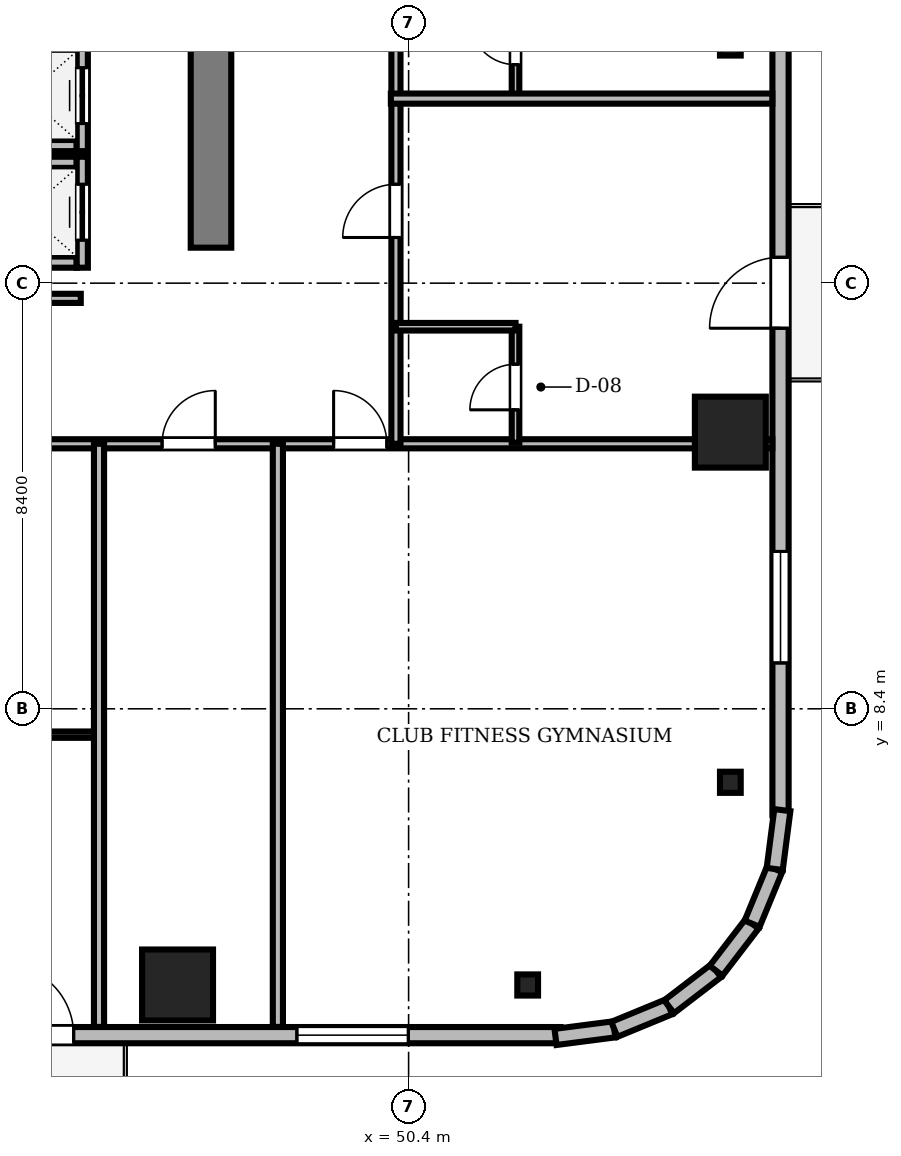
"""IFC4 building model, lengths in metres.
Left out: names, types, materials, properties, quantities, classifications, styles, units other than length and angle.
Written with IfcOpenShell. Run it as: python <this file> out.ifc"""

import sys

from ifc_helpers import new_model, si_unit, direction, frame, frame_2d, origin, origin_2d, place, context, subcontext, project, spatial, rectangle, i_section, extrude, source, transform, mapped, element, fill, save


model = new_model("IFC4")
c1 = context("Model", 3, precision=1e-05, world=origin(), true_north=direction((0.0, 1.0)))
c2 = subcontext(c1, "Body", "Model", "MODEL_VIEW")
j1 = project(units=[si_unit("LENGTHUNIT", "METRE"), si_unit("PLANEANGLEUNIT", "RADIAN")], contexts=[c1])
p1 = place(None, origin())
s1 = spatial("IfcSite", under=j1, at=p1, CompositionType="ELEMENT")
p2 = place(p1, origin())
s2 = spatial("IfcBuilding", under=s1, at=p2, CompositionType="ELEMENT")
p3 = place(p2, frame((0.0, 0.0, 229.8)))
s3 = spatial("IfcBuildingStorey", under=s2, at=p3, CompositionType="ELEMENT", Elevation=229.8)
m1 = source(origin(), c2, "Body", "SweptSolid", [
    extrude(rectangle(XDim=13.15, YDim=0.8, at=frame_2d((6.575, 0.0))), origin(), (0.0, 0.0, 1.0), 3.53),
])
p4 = place(p3, frame((46.5, 17.5, 0.0), z_axis=(0.0, 0.0, 1.0), x_axis=(0.0, 1.0, 0.0)))
e1 = element("IfcWall", 1, at=p4, inside=s3, PredefinedType="SHEAR", context=c2, shape_type="MappedRepresentation", body=[
    mapped(m1, transform((0.0, 0.0, 0.0), scale=1.0)),
])
m2 = source(origin(), c2, "Body", "SweptSolid", [
    extrude(rectangle(XDim=1.4, YDim=1.4, at=origin_2d()), origin(), (0.0, 0.0, 1.0), 3.53),
])
for number, where, z_axis, x_axis in (
    (2, (45.84, 2.95, 0.0), (0.0, 0.0, 1.0), (1.0, 0.0, 0.0)),
    (3, (56.75, 13.86, 0.0), (0.0, 0.0, 1.0), (1.0, 0.0, 0.0)),
):
    element("IfcColumn", number, at=place(p3, frame(where, z_axis=z_axis, x_axis=x_axis)), inside=s3, PredefinedType="COLUMN", context=c2, shape_type="MappedRepresentation", body=[
        mapped(m2, transform((0.0, 0.0, 0.0), scale=1.0)),
    ])
m3 = source(origin(), c2, "Body", "SweptSolid", [
    extrude(i_section(OverallWidth=0.409, OverallDepth=0.417, WebThickness=0.021, FlangeThickness=0.033, FilletRadius=0.015, at=origin_2d()), origin(), (0.0, 0.0, 1.0), 3.53),
])
for number, where, z_axis, x_axis in (
    (4, (52.75, 2.95, 0.0), (0.0, 0.0, 1.0), (1.0, 0.0, 0.0)),
    (5, (56.75, 6.95, 0.0), (0.0, 0.0, 1.0), (1.0, 0.0, 0.0)),
    (6, (56.75, 21.5, 0.0), (0.0, 0.0, 1.0), (1.0, 0.0, 0.0)),
):
    element("IfcColumn", number, at=place(p3, frame(where, z_axis=z_axis, x_axis=x_axis)), inside=s3, PredefinedType="COLUMN", context=c2, shape_type="MappedRepresentation", body=[
        mapped(m3, transform((0.0, 0.0, 0.0), scale=1.0)),
    ])
m4 = source(origin(), c2, "Body", "SweptSolid", [
    extrude(rectangle(XDim=15.6, YDim=0.32, at=frame_2d((7.8, 0.0))), origin(), (0.0, 0.0, 1.0), 3.53),
])
p5 = place(p3, frame((37.8, 1.96, 0.0), z_axis=(0.0, 0.0, 1.0), x_axis=(1.0, 0.0, 0.0)))
e7 = element("IfcWall", 7, at=p5, inside=s3, PredefinedType="SOLIDWALL", context=c2, shape_type="MappedRepresentation", body=[
    mapped(m4, transform((0.0, 0.0, 0.0), scale=1.0)),
])
m5 = source(origin(), c2, "Body", "SweptSolid", [
    extrude(rectangle(XDim=1.4, YDim=2.3, at=frame_2d((0.7, 1.15))), frame((0.0, 0.17, 0.0), z_axis=(0.0, -1.0, 0.0), x_axis=(1.0, 0.0, 0.0)), (0.0, 0.0, 1.0), 0.34),
])
p6 = place(p5, frame((4.59, 0.0, 0.0)))
e8 = element("IfcOpeningElement", 8, at=p6, cuts=e7, PredefinedType="OPENING", context=c2, shape_type="MappedRepresentation", body=[
    mapped(m5, transform((0.0, 0.0, 0.0), scale=1.0)),
])
m6 = source(origin(), c2, "Body", "SweptSolid", [
    extrude(rectangle(XDim=2.2, YDim=2.4, at=frame_2d((1.1, 1.2))), frame((0.0, 0.17, 0.0), z_axis=(0.0, -1.0, 0.0), x_axis=(1.0, 0.0, 0.0)), (0.0, 0.0, 1.0), 0.34),
])
p7 = place(p5, frame((10.395, 0.0, 0.72)))
e9 = element("IfcOpeningElement", 9, at=p7, cuts=e7, PredefinedType="OPENING", context=c2, shape_type="MappedRepresentation", body=[
    mapped(m6, transform((0.0, 0.0, 0.0), scale=1.0)),
])
p8 = place(p3, frame((57.74, 6.3, 0.0), z_axis=(0.0, 0.0, 1.0), x_axis=(0.0, 1.0, 0.0)))
e10 = element("IfcWall", 10, at=p8, inside=s3, PredefinedType="SOLIDWALL", context=c2, shape_type="MappedRepresentation", body=[
    mapped(m4, transform((0.0, 0.0, 0.0), scale=1.0)),
])
p9 = place(p8, frame((9.61, 0.0, 0.0)))
e11 = element("IfcOpeningElement", 11, at=p9, cuts=e10, PredefinedType="OPENING", context=c2, shape_type="MappedRepresentation", body=[
    mapped(m5, transform((0.0, 0.0, 0.0), scale=1.0)),
])
p10 = place(p8, frame((3.005, 0.0, 0.72)))
e12 = element("IfcOpeningElement", 12, at=p10, cuts=e10, PredefinedType="OPENING", context=c2, shape_type="MappedRepresentation", body=[
    mapped(m6, transform((0.0, 0.0, 0.0), scale=1.0)),
])
m7 = source(origin(), c2, "Body", "SweptSolid", [
    extrude(rectangle(XDim=1.17, YDim=0.32, at=frame_2d((0.585, 0.0))), origin(), (0.0, 0.0, 1.0), 3.53),
])
p11 = place(p3, frame((53.3, 1.925, 0.0), z_axis=(0.0, 0.0, 1.0), x_axis=(0.991762485493, 0.128090485085, 0.0)))
e13 = element("IfcWall", 13, at=p11, inside=s3, PredefinedType="SOLIDWALL", context=c2, shape_type="MappedRepresentation", body=[
    mapped(m7, transform((0.0, 0.0, 0.0), scale=1.0)),
])
m8 = source(origin(), c2, "Body", "SweptSolid", [
    extrude(rectangle(XDim=1.169, YDim=0.32, at=frame_2d((0.585, 0.0))), origin(), (0.0, 0.0, 1.0), 3.53),
])
p12 = place(p3, frame((54.46, 2.074, 0.0), z_axis=(0.0, 0.0, 1.0), x_axis=(0.924479075121, 0.381232789334, 0.0)))
e14 = element("IfcWall", 14, at=p12, inside=s3, PredefinedType="SOLIDWALL", context=c2, shape_type="MappedRepresentation", body=[
    mapped(m8, transform((0.0, 0.0, 0.0), scale=1.0)),
])
m9 = source(origin(), c2, "Body", "SweptSolid", [
    extrude(rectangle(XDim=1.169, YDim=0.32, at=frame_2d((0.584, 0.0))), origin(), (0.0, 0.0, 1.0), 3.53),
])
p13 = place(p3, frame((55.541, 2.52, 0.0), z_axis=(0.0, 0.0, 1.0), x_axis=(0.793663520347, 0.608356981114, 0.0)))
e15 = element("IfcWall", 15, at=p13, inside=s3, PredefinedType="SOLIDWALL", context=c2, shape_type="MappedRepresentation", body=[
    mapped(m9, transform((0.0, 0.0, 0.0), scale=1.0)),
])
m10 = source(origin(), c2, "Body", "SweptSolid", [
    extrude(rectangle(XDim=1.169, YDim=0.32, at=frame_2d((0.584, 0.0))), origin(), (0.0, 0.0, 1.0), 3.53),
])
for number, where, z_axis, x_axis in (
    (16, (56.469, 3.231, 0.0), (0.0, 0.0, 1.0), (0.608, 0.794, 0.0)),
    (17, (57.18, 4.159, 0.0), (0.0, 0.0, 1.0), (0.381, 0.925, 0.0)),
):
    element("IfcWall", number, at=place(p3, frame(where, z_axis=z_axis, x_axis=x_axis)), inside=s3, PredefinedType="SOLIDWALL", context=c2, shape_type="MappedRepresentation", body=[
        mapped(m10, transform((0.0, 0.0, 0.0), scale=1.0)),
    ])
m11 = source(origin(), c2, "Body", "SweptSolid", [
    extrude(rectangle(XDim=1.171, YDim=0.32, at=frame_2d((0.585, 0.0))), origin(), (0.0, 0.0, 1.0), 3.53),
])
p14 = place(p3, frame((57.625, 5.24, 0.0), z_axis=(0.0, 0.0, 1.0), x_axis=(0.128269133229, 0.991739395941, 0.0)))
e18 = element("IfcWall", 18, at=p14, inside=s3, PredefinedType="SOLIDWALL", context=c2, shape_type="MappedRepresentation", body=[
    mapped(m11, transform((0.0, 0.0, 0.0), scale=1.0)),
])
m12 = source(origin(), c2, "Body", "SweptSolid", [
    extrude(rectangle(XDim=2.0, YDim=0.22, at=frame_2d((1.0, 0.0))), origin(), (0.0, 0.0, 1.0), 3.53),
])
p15 = place(p3, frame((41.85, 19.515, 0.0), z_axis=(0.0, 0.0, 1.0), x_axis=(1.0, 0.0, 0.0)))
e19 = element("IfcWall", 19, at=p15, inside=s3, PredefinedType="SOLIDWALL", context=c2, shape_type="MappedRepresentation", body=[
    mapped(m12, transform((0.0, 0.0, 0.0), scale=1.0)),
])
m13 = source(origin(), c2, "Body", "SweptSolid", [
    extrude(rectangle(XDim=2.19, YDim=0.22, at=frame_2d((1.095, 0.0))), origin(), (0.0, 0.0, 1.0), 3.53),
])
p16 = place(p3, frame((43.96, 19.405, 0.0), z_axis=(0.0, 0.0, 1.0), x_axis=(0.0, 1.0, 0.0)))
e20 = element("IfcWall", 20, at=p16, inside=s3, PredefinedType="SOLIDWALL", context=c2, shape_type="MappedRepresentation", body=[
    mapped(m13, transform((0.0, 0.0, 0.0), scale=1.0)),
])
m14 = source(origin(), c2, "Body", "SweptSolid", [
    extrude(rectangle(XDim=1.1, YDim=2.2, at=frame_2d((0.55, 1.1))), frame((0.0, 0.12, 0.0), z_axis=(0.0, -1.0, 0.0), x_axis=(1.0, 0.0, 0.0)), (0.0, 0.0, 1.0), 0.24),
])
p17 = place(p16, frame((0.545, 0.0, 0.0)))
e21 = element("IfcOpeningElement", 21, at=p17, cuts=e20, PredefinedType="OPENING", context=c2, shape_type="MappedRepresentation", body=[
    mapped(m14, transform((0.0, 0.0, 0.0), scale=1.0)),
])
for number, where, z_axis, x_axis in (
    (22, (41.85, 17.215, 0.0), (0.0, 0.0, 1.0), (1.0, 0.0, 0.0)),
    (23, (41.85, 19.185, 0.0), (0.0, 0.0, 1.0), (1.0, 0.0, 0.0)),
):
    element("IfcWall", number, at=place(p3, frame(where, z_axis=z_axis, x_axis=x_axis)), inside=s3, PredefinedType="SOLIDWALL", context=c2, shape_type="MappedRepresentation", body=[
        mapped(m12, transform((0.0, 0.0, 0.0), scale=1.0)),
    ])
p18 = place(p3, frame((43.96, 17.105, 0.0), z_axis=(0.0, 0.0, 1.0), x_axis=(0.0, 1.0, 0.0)))
e24 = element("IfcWall", 24, at=p18, inside=s3, PredefinedType="SOLIDWALL", context=c2, shape_type="MappedRepresentation", body=[
    mapped(m13, transform((0.0, 0.0, 0.0), scale=1.0)),
])
p19 = place(p18, frame((0.545, 0.0, 0.0)))
e25 = element("IfcOpeningElement", 25, at=p19, cuts=e24, PredefinedType="OPENING", context=c2, shape_type="MappedRepresentation", body=[
    mapped(m14, transform((0.0, 0.0, 0.0), scale=1.0)),
])
m15 = source(origin(), c2, "Body", "SweptSolid", [
    extrude(rectangle(XDim=46.156, YDim=0.18, at=frame_2d((23.078, 0.0))), origin(), (0.0, 0.0, 1.0), 2.772),
])
p20 = place(p3, frame((11.422, 13.63, 0.0), z_axis=(0.0, 0.0, 1.0), x_axis=(1.0, 0.0, 0.0)))
e26 = element("IfcWall", 26, at=p20, inside=s3, PredefinedType="PARTITIONING", context=c2, shape_type="MappedRepresentation", body=[
    mapped(m15, transform((0.0, 0.0, 0.0), scale=1.0)),
])
m16 = source(origin(), c2, "Body", "SweptSolid", [
    extrude(rectangle(XDim=1.05, YDim=2.2, at=frame_2d((0.525, 1.1))), frame((0.0, 0.1, 0.0), z_axis=(0.0, -1.0, 0.0), x_axis=(1.0, 0.0, 0.0)), (0.0, 0.0, 1.0), 0.2),
])
p21 = place(p20, frame((12.478, 0.0, 0.0)))
e27 = element("IfcOpeningElement", 27, at=p21, cuts=e26, PredefinedType="OPENING", context=c2, shape_type="MappedRepresentation", body=[
    mapped(m16, transform((0.0, 0.0, 0.0), scale=1.0)),
])
p22 = place(p20, frame((16.129, 0.0, 0.0)))
e28 = element("IfcOpeningElement", 28, at=p22, cuts=e26, PredefinedType="OPENING", context=c2, shape_type="MappedRepresentation", body=[
    mapped(m16, transform((0.0, 0.0, 0.0), scale=1.0)),
])
p23 = place(p20, frame((21.772, 0.0, 0.0)))
e29 = element("IfcOpeningElement", 29, at=p23, cuts=e26, PredefinedType="OPENING", context=c2, shape_type="MappedRepresentation", body=[
    mapped(m16, transform((0.0, 0.0, 0.0), scale=1.0)),
])
p24 = place(p20, frame((28.47, 0.0, 0.0)))
e30 = element("IfcOpeningElement", 30, at=p24, cuts=e26, PredefinedType="OPENING", context=c2, shape_type="MappedRepresentation", body=[
    mapped(m16, transform((0.0, 0.0, 0.0), scale=1.0)),
])
p25 = place(p20, frame((34.113, 0.0, 0.0)))
e31 = element("IfcOpeningElement", 31, at=p25, cuts=e26, PredefinedType="OPENING", context=c2, shape_type="MappedRepresentation", body=[
    mapped(m16, transform((0.0, 0.0, 0.0), scale=1.0)),
])
p26 = place(p20, frame((37.498, 0.0, 0.0)))
e32 = element("IfcOpeningElement", 32, at=p26, cuts=e26, PredefinedType="OPENING", context=c2, shape_type="MappedRepresentation", body=[
    mapped(m16, transform((0.0, 0.0, 0.0), scale=1.0)),
])
m17 = source(origin(), c2, "Body", "SweptSolid", [
    extrude(rectangle(XDim=27.47, YDim=0.18, at=frame_2d((13.735, 0.0))), origin(), (0.0, 0.0, 1.0), 2.972),
])
p27 = place(p3, frame((50.15, 13.63, 0.0), z_axis=(0.0, 0.0, 1.0), x_axis=(0.0, 1.0, 0.0)))
e33 = element("IfcWall", 33, at=p27, inside=s3, PredefinedType="PARTITIONING", context=c2, shape_type="MappedRepresentation", body=[
    mapped(m17, transform((0.0, 0.0, 0.0), scale=1.0)),
])
p28 = place(p27, frame((4.071, 0.0, 0.0)))
e34 = element("IfcOpeningElement", 34, at=p28, cuts=e33, PredefinedType="OPENING", context=c2, shape_type="MappedRepresentation", body=[
    mapped(m16, transform((0.0, 0.0, 0.0), scale=1.0)),
])
p29 = place(p27, frame((10.884, 0.0, 0.0)))
e35 = element("IfcOpeningElement", 35, at=p29, cuts=e33, PredefinedType="OPENING", context=c2, shape_type="MappedRepresentation", body=[
    mapped(m16, transform((0.0, 0.0, 0.0), scale=1.0)),
])
p30 = place(p27, frame((17.696, 0.0, 0.0)))
e36 = element("IfcOpeningElement", 36, at=p30, cuts=e33, PredefinedType="OPENING", context=c2, shape_type="MappedRepresentation", body=[
    mapped(m16, transform((0.0, 0.0, 0.0), scale=1.0)),
])
p31 = place(p27, frame((24.509, 0.0, 0.0)))
e37 = element("IfcOpeningElement", 37, at=p31, cuts=e33, PredefinedType="OPENING", context=c2, shape_type="MappedRepresentation", body=[
    mapped(m16, transform((0.0, 0.0, 0.0), scale=1.0)),
])
m18 = source(origin(), c2, "Body", "SweptSolid", [
    extrude(rectangle(XDim=7.755, YDim=0.125, at=frame_2d((3.877, 0.0))), origin(), (0.0, 0.0, 1.0), 2.972),
])
p32 = place(p3, frame((36.535, 7.89, 0.0), z_axis=(0.0, 0.0, 1.0), x_axis=(1.0, 0.0, 0.0)))
e38 = element("IfcWall", 38, at=p32, inside=s3, PredefinedType="PARTITIONING", context=c2, shape_type="MappedRepresentation", body=[
    mapped(m18, transform((0.0, 0.0, 0.0), scale=1.0)),
])
m19 = source(origin(), c2, "Body", "SweptSolid", [
    extrude(rectangle(XDim=0.95, YDim=2.15, at=frame_2d((0.475, 1.075))), frame((0.0, 0.073, 0.0), z_axis=(0.0, -1.0, 0.0), x_axis=(1.0, 0.0, 0.0)), (0.0, 0.0, 1.0), 0.145),
])
p33 = place(p32, frame((3.397, 0.0, 0.0)))
e39 = element("IfcOpeningElement", 39, at=p33, cuts=e38, PredefinedType="OPENING", context=c2, shape_type="MappedRepresentation", body=[
    mapped(m19, transform((0.0, 0.0, 0.0), scale=1.0)),
])
m20 = source(origin(), c2, "Body", "SweptSolid", [
    extrude(rectangle(XDim=2.33, YDim=0.18, at=frame_2d((1.165, 0.0))), origin(), (0.0, 0.0, 1.0), 2.972),
])
p34 = place(p3, frame((41.6, 16.5, 0.0), z_axis=(0.0, 0.0, 1.0), x_axis=(1.0, 0.0, 0.0)))
e40 = element("IfcWall", 40, at=p34, inside=s3, PredefinedType="PARTITIONING", context=c2, shape_type="MappedRepresentation", body=[
    mapped(m20, transform((0.0, 0.0, 0.0), scale=1.0)),
])
p35 = place(p34, frame((0.55, 0.0, 0.0)))
e41 = element("IfcOpeningElement", 41, at=p35, cuts=e40, PredefinedType="OPENING", context=c2, shape_type="MappedRepresentation", body=[
    mapped(m16, transform((0.0, 0.0, 0.0), scale=1.0)),
])
m21 = source(origin(), c2, "Body", "SweptSolid", [
    extrude(rectangle(XDim=2.29, YDim=0.15, at=frame_2d((1.145, 0.0))), origin(), (0.0, 0.0, 1.0), 2.972),
])
p36 = place(p3, frame((52.51, 13.65, 0.0), z_axis=(0.0, 0.0, 1.0), x_axis=(0.0, 1.0, 0.0)))
e42 = element("IfcWall", 42, at=p36, inside=s3, PredefinedType="PARTITIONING", context=c2, shape_type="MappedRepresentation", body=[
    mapped(m21, transform((0.0, 0.0, 0.0), scale=1.0)),
])
m22 = source(origin(), c2, "Body", "SweptSolid", [
    extrude(rectangle(XDim=0.9, YDim=2.1, at=frame_2d((0.45, 1.05))), frame((0.0, 0.085, 0.0), z_axis=(0.0, -1.0, 0.0), x_axis=(1.0, 0.0, 0.0)), (0.0, 0.0, 1.0), 0.17),
])
p37 = place(p36, frame((0.65, 0.0, 0.0)))
e43 = element("IfcOpeningElement", 43, at=p37, cuts=e42, PredefinedType="OPENING", context=c2, shape_type="MappedRepresentation", body=[
    mapped(m22, transform((0.0, 0.0, 0.0), scale=1.0)),
])
m23 = source(origin(), c2, "Body", "SweptSolid", [
    extrude(rectangle(XDim=2.29, YDim=0.15, at=frame_2d((1.145, 0.0))), origin(), (0.0, 0.0, 1.0), 3.53),
])
p38 = place(p3, frame((52.51, 20.462, 0.0), z_axis=(0.0, 0.0, 1.0), x_axis=(0.0, 1.0, 0.0)))
e44 = element("IfcWall", 44, at=p38, inside=s3, PredefinedType="PARTITIONING", context=c2, shape_type="MappedRepresentation", body=[
    mapped(m23, transform((0.0, 0.0, 0.0), scale=1.0)),
])
p39 = place(p38, frame((0.65, 0.0, 0.0)))
e45 = element("IfcOpeningElement", 45, at=p39, cuts=e44, PredefinedType="OPENING", context=c2, shape_type="MappedRepresentation", body=[
    mapped(m22, transform((0.0, 0.0, 0.0), scale=1.0)),
])
m24 = source(origin(), c2, "Body", "SweptSolid", [
    extrude(rectangle(XDim=11.508, YDim=0.2, at=frame_2d((5.754, 0.0))), origin(), (0.0, 0.0, 1.0), 2.772),
])
for number, where, z_axis, x_axis in (
    (46, (44.29, 2.122, 0.0), (0.0, 0.0, 1.0), (0.0, 1.0, 0.0)),
    (47, (47.82, 2.122, 0.0), (0.0, 0.0, 1.0), (0.0, 1.0, 0.0)),
):
    element("IfcWall", number, at=place(p3, frame(where, z_axis=z_axis, x_axis=x_axis)), inside=s3, PredefinedType="PARTITIONING", context=c2, shape_type="MappedRepresentation", body=[
        mapped(m24, transform((0.0, 0.0, 0.0), scale=1.0)),
    ])
m25 = source(origin(), c2, "Body", "SweptSolid", [
    extrude(rectangle(XDim=7.528, YDim=0.2, at=frame_2d((3.764, 0.0))), origin(), (0.0, 0.0, 1.0), 2.772),
])
p40 = place(p3, frame((50.05, 20.442, 0.0), z_axis=(0.0, 0.0, 1.0), x_axis=(1.0, 0.0, 0.0)))
e48 = element("IfcWall", 48, at=p40, inside=s3, PredefinedType="PARTITIONING", context=c2, shape_type="MappedRepresentation", body=[
    mapped(m25, transform((0.0, 0.0, 0.0), scale=1.0)),
])
m26 = source(origin(), c2, "Body", "SweptSolid", [
    extrude(rectangle(XDim=2.36, YDim=0.15, at=frame_2d((1.18, 0.0))), origin(), (0.0, 0.0, 1.0), 3.53),
])
p41 = place(p3, frame((50.15, 15.94, 0.0), z_axis=(0.0, 0.0, 1.0), x_axis=(1.0, 0.0, 0.0)))
e49 = element("IfcWall", 49, at=p41, inside=s3, PredefinedType="PARTITIONING", context=c2, shape_type="MappedRepresentation", body=[
    mapped(m26, transform((0.0, 0.0, 0.0), scale=1.0)),
])
m27 = source(origin(), c2, "Body", "SweptSolid", [
    extrude(rectangle(XDim=1.858, YDim=0.18, at=frame_2d((0.929, 0.0))), origin(), (0.0, 0.0, 1.0), 3.53),
])
p42 = place(p3, frame((41.852, 18.45, 0.0), z_axis=(0.0, 0.0, 1.0), x_axis=(1.0, 0.0, 0.0)))
e50 = element("IfcWall", 50, at=p42, inside=s3, PredefinedType="PARTITIONING", context=c2, shape_type="MappedRepresentation", body=[
    mapped(m27, transform((0.0, 0.0, 0.0), scale=1.0)),
])
m28 = source(origin(), c2, "Body", "SweptSolid", [
    extrude(rectangle(XDim=1.4, YDim=2.3, at=frame_2d((0.7, 1.15))), frame((0.0, 0.025, 0.0), z_axis=(0.0, -1.0, 0.0), x_axis=(1.0, 0.0, 0.0)), (0.0, 0.0, 1.0), 0.05),
])
p43 = place(p6, frame((1.4, 0.0, 0.0), z_axis=(0.0, 0.0, 1.0), x_axis=(-1.0, 0.0, 0.0)))
e51 = element("IfcDoor", 51, at=p43, inside=s3, OperationType="DOUBLE_DOOR_SLIDING", PredefinedType="DOOR", context=c2, shape_type="MappedRepresentation", body=[
    mapped(m28, transform((0.0, 0.0, 0.0), scale=1.0)),
])
fill(e8, e51)
m29 = source(origin(), c2, "Body", "SweptSolid", [
    extrude(rectangle(XDim=2.2, YDim=2.4, at=frame_2d((1.1, 1.2))), frame((0.0, 0.03, 0.0), z_axis=(0.0, -1.0, 0.0), x_axis=(1.0, 0.0, 0.0)), (0.0, 0.0, 1.0), 0.06),
])
p44 = place(p7, origin())
e52 = element("IfcWindow", 52, at=p44, inside=s3, PartitioningType="SINGLE_PANEL", PredefinedType="WINDOW", context=c2, shape_type="MappedRepresentation", body=[
    mapped(m29, transform((0.0, 0.0, 0.0), scale=1.0)),
])
fill(e9, e52)
p45 = place(p9, frame((1.4, 0.0, 0.0), z_axis=(0.0, 0.0, 1.0), x_axis=(-1.0, 0.0, 0.0)))
e53 = element("IfcDoor", 53, at=p45, inside=s3, OperationType="DOUBLE_DOOR_SLIDING", PredefinedType="DOOR", context=c2, shape_type="MappedRepresentation", body=[
    mapped(m28, transform((0.0, 0.0, 0.0), scale=1.0)),
])
fill(e11, e53)
p46 = place(p10, origin())
e54 = element("IfcWindow", 54, at=p46, inside=s3, PartitioningType="SINGLE_PANEL", PredefinedType="WINDOW", context=c2, shape_type="MappedRepresentation", body=[
    mapped(m29, transform((0.0, 0.0, 0.0), scale=1.0)),
])
fill(e12, e54)
m30 = source(origin(), c2, "Body", "SweptSolid", [
    extrude(rectangle(XDim=1.1, YDim=2.2, at=frame_2d((0.55, 1.1))), frame((0.0, 0.025, 0.0), z_axis=(0.0, -1.0, 0.0), x_axis=(1.0, 0.0, 0.0)), (0.0, 0.0, 1.0), 0.05),
])
p47 = place(p17, origin())
e55 = element("IfcDoor", 55, at=p47, inside=s3, OperationType="DOUBLE_DOOR_SLIDING", PredefinedType="DOOR", context=c2, shape_type="MappedRepresentation", body=[
    mapped(m30, transform((0.0, 0.0, 0.0), scale=1.0)),
])
fill(e21, e55)
p48 = place(p19, origin())
e56 = element("IfcDoor", 56, at=p48, inside=s3, OperationType="DOUBLE_DOOR_SLIDING", PredefinedType="DOOR", context=c2, shape_type="MappedRepresentation", body=[
    mapped(m30, transform((0.0, 0.0, 0.0), scale=1.0)),
])
fill(e25, e56)
m31 = source(origin(), c2, "Body", "SweptSolid", [
    extrude(rectangle(XDim=1.05, YDim=2.2, at=frame_2d((0.525, 1.1))), frame((0.0, 0.025, 0.0), z_axis=(0.0, -1.0, 0.0), x_axis=(1.0, 0.0, 0.0)), (0.0, 0.0, 1.0), 0.05),
])
p49 = place(p25, origin())
e57 = element("IfcDoor", 57, at=p49, inside=s3, OperationType="SINGLE_SWING_RIGHT", PredefinedType="DOOR", context=c2, shape_type="MappedRepresentation", body=[
    mapped(m31, transform((0.0, 0.0, 0.0), scale=1.0)),
])
fill(e31, e57)
p50 = place(p26, origin())
e58 = element("IfcDoor", 58, at=p50, inside=s3, OperationType="SINGLE_SWING_LEFT", PredefinedType="DOOR", context=c2, shape_type="MappedRepresentation", body=[
    mapped(m31, transform((0.0, 0.0, 0.0), scale=1.0)),
])
fill(e32, e58)
p51 = place(p28, origin())
e59 = element("IfcDoor", 59, at=p51, inside=s3, OperationType="SINGLE_SWING_LEFT", PredefinedType="DOOR", context=c2, shape_type="MappedRepresentation", body=[
    mapped(m31, transform((0.0, 0.0, 0.0), scale=1.0)),
])
fill(e34, e59)
m32 = source(origin(), c2, "Body", "SweptSolid", [
    extrude(rectangle(XDim=0.9, YDim=2.1, at=frame_2d((0.45, 1.05))), frame((0.0, 0.025, 0.0), z_axis=(0.0, -1.0, 0.0), x_axis=(1.0, 0.0, 0.0)), (0.0, 0.0, 1.0), 0.05),
])
p52 = place(p37, origin())
e60 = element("IfcDoor", 60, at=p52, inside=s3, OperationType="SINGLE_SWING_LEFT", PredefinedType="DOOR", context=c2, shape_type="MappedRepresentation", body=[
    mapped(m32, transform((0.0, 0.0, 0.0), scale=1.0)),
])
fill(e43, e60)
p53 = place(p39, origin())
e61 = element("IfcDoor", 61, at=p53, inside=s3, OperationType="SINGLE_SWING_RIGHT", PredefinedType="DOOR", context=c2, shape_type="MappedRepresentation", body=[
    mapped(m32, transform((0.0, 0.0, 0.0), scale=1.0)),
])
fill(e45, e61)
save(model, sys.argv[1])
